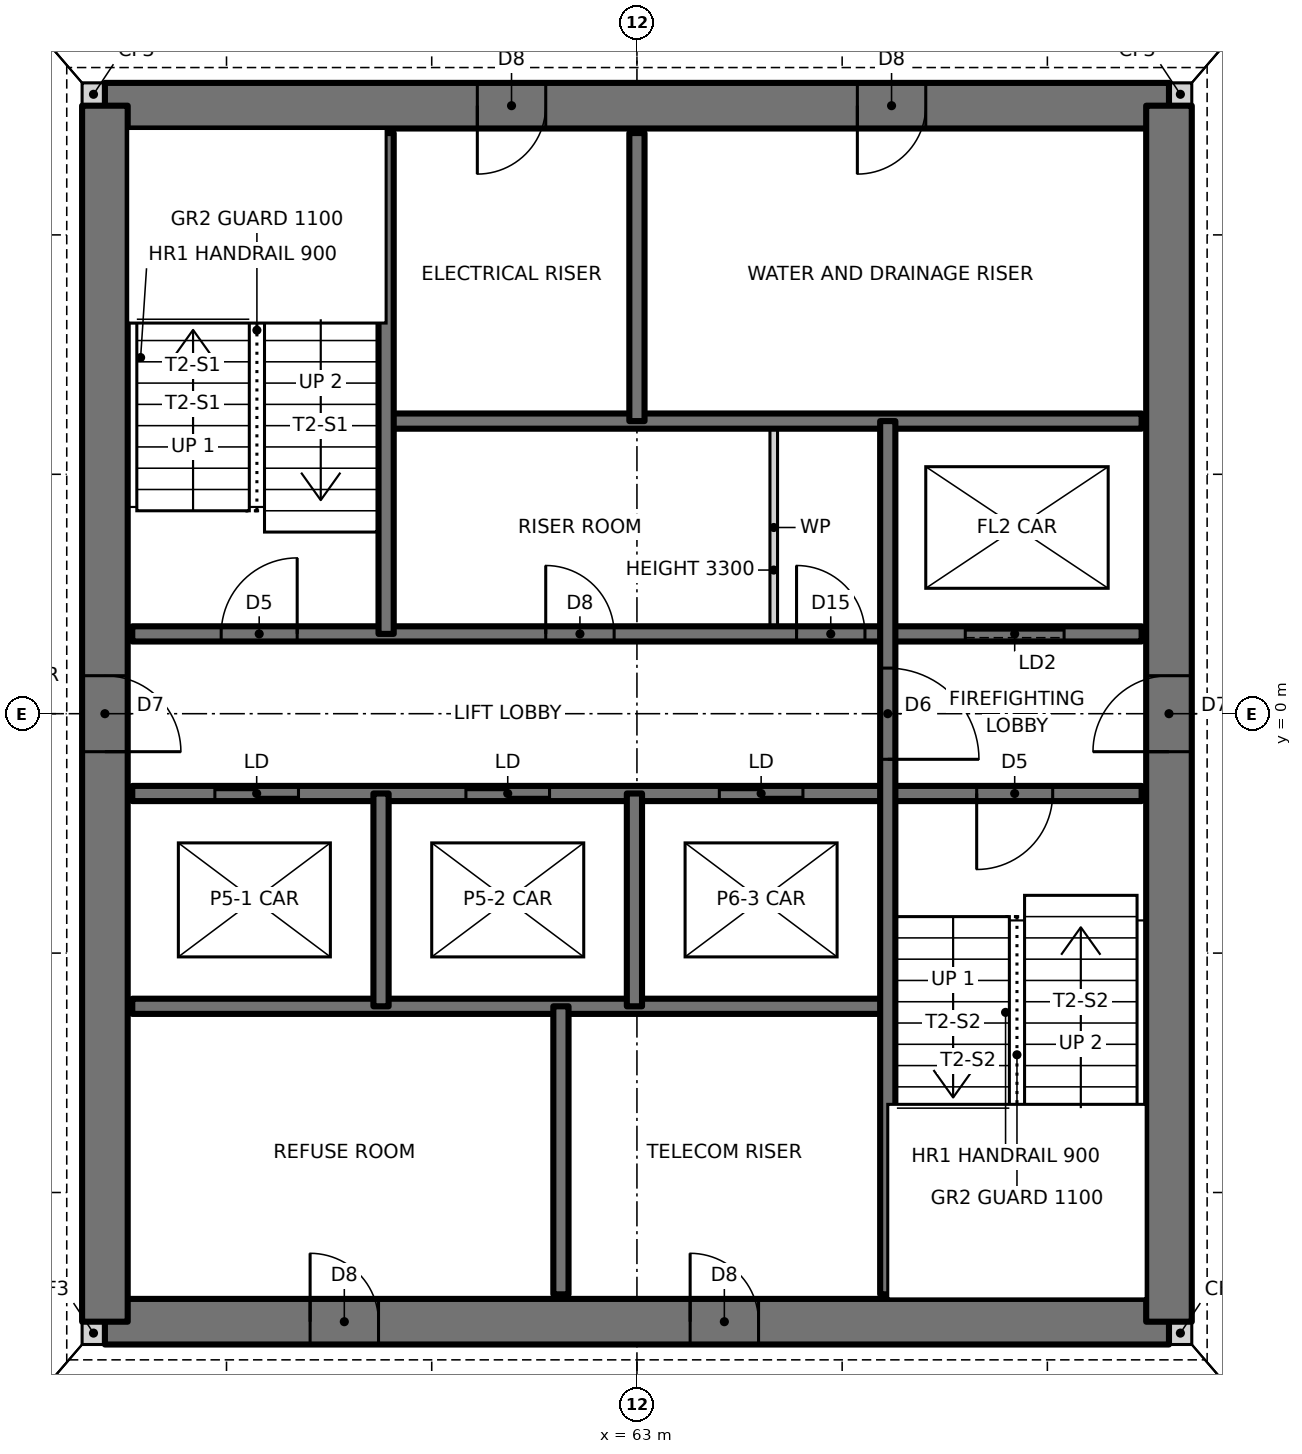
"""IFC4 building model, lengths in metres.
Left out: names, types, materials, properties, quantities, classifications, styles, units other than length and angle.
Written with IfcOpenShell. Run it as: python <this file> out.ifc"""

import sys

from ifc_helpers import new_model, si_unit, direction, frame, frame_2d, origin, place, context, subcontext, project, spatial, rectangle, extrude, element, fill, save


model = new_model("IFC4")
c1 = context("Model", 3, precision=1e-05, world=origin(), true_north=direction((0.0, 1.0)))
c2 = subcontext(c1, "Body", "Model", "MODEL_VIEW")
j1 = project(units=[si_unit("LENGTHUNIT", "METRE"), si_unit("PLANEANGLEUNIT", "RADIAN")], contexts=[c1])
p1 = place(None, origin())
s1 = spatial("IfcSite", under=j1, at=p1, CompositionType="ELEMENT")
p2 = place(p1, origin())
s2 = spatial("IfcBuilding", under=s1, at=p2, CompositionType="ELEMENT")
p3 = place(p2, frame((0.0, 0.0, 53.5)))
s3 = spatial("IfcBuildingStorey", under=s2, at=p3, CompositionType="ELEMENT", Elevation=53.5)
for number, where, z_axis, x_axis in (
    (1, (55.7, -8.15, 0.0), (0.0, 0.0, 1.0), (1.0, 0.0, 0.0)),
    (2, (70.0, -8.15, 0.0), (0.0, 0.0, 1.0), (1.0, 0.0, 0.0)),
    (3, (70.0, 8.15, 0.0), (0.0, 0.0, 1.0), (1.0, 0.0, 0.0)),
    (4, (55.7, 8.15, 0.0), (0.0, 0.0, 1.0), (1.0, 0.0, 0.0)),
):
    element("IfcWall", number, at=place(p3, frame(where, z_axis=z_axis, x_axis=x_axis)), inside=s3, PredefinedType="SOLIDWALL", context=c2, shape_type="SweptSolid", body=[
        extrude(rectangle(XDim=0.3, YDim=0.3, at=frame_2d((0.15, 0.0))), origin(), (0.0, 0.0, 1.0), 3.5),
    ])
p4 = place(p3, frame((56.0, -8.0, 0.0), z_axis=(0.0, 0.0, 1.0), x_axis=(1.0, 0.0, 0.0)))
e5 = element("IfcWall", 5, at=p4, inside=s3, PredefinedType="SHEAR", context=c2, shape_type="SweptSolid", body=[
    extrude(rectangle(XDim=14.0, YDim=0.6, at=frame_2d((7.0, 0.0))), origin(), (0.0, 0.0, 1.0), 3.5),
])
p5 = place(p4, frame((2.7, 0.0, 0.0)))
e6 = element("IfcOpeningElement", 6, at=p5, cuts=e5, PredefinedType="OPENING", context=c2, shape_type="SweptSolid", body=[
    extrude(rectangle(XDim=0.9, YDim=2.1, at=frame_2d((0.45, 1.05))), frame((0.0, 0.31, 0.0), z_axis=(0.0, -1.0, 0.0), x_axis=(1.0, 0.0, 0.0)), (0.0, 0.0, 1.0), 0.62),
])
p6 = place(p4, frame((7.7, 0.0, 0.0)))
e7 = element("IfcOpeningElement", 7, at=p6, cuts=e5, PredefinedType="OPENING", context=c2, shape_type="SweptSolid", body=[
    extrude(rectangle(XDim=0.9, YDim=2.1, at=frame_2d((0.45, 1.05))), frame((0.0, 0.31, 0.0), z_axis=(0.0, -1.0, 0.0), x_axis=(1.0, 0.0, 0.0)), (0.0, 0.0, 1.0), 0.62),
])
p7 = place(p3, frame((70.0, 8.0, 0.0), z_axis=(0.0, 0.0, 1.0), x_axis=(-1.0, 0.0, 0.0)))
e8 = element("IfcWall", 8, at=p7, inside=s3, PredefinedType="SHEAR", context=c2, shape_type="SweptSolid", body=[
    extrude(rectangle(XDim=14.0, YDim=0.6, at=frame_2d((7.0, 0.0))), origin(), (0.0, 0.0, 1.0), 3.5),
])
p8 = place(p7, frame((8.2, 0.0, 0.0)))
e9 = element("IfcOpeningElement", 9, at=p8, cuts=e8, PredefinedType="OPENING", context=c2, shape_type="SweptSolid", body=[
    extrude(rectangle(XDim=0.9, YDim=2.1, at=frame_2d((0.45, 1.05))), frame((0.0, 0.31, 0.0), z_axis=(0.0, -1.0, 0.0), x_axis=(1.0, 0.0, 0.0)), (0.0, 0.0, 1.0), 0.62),
])
p9 = place(p7, frame((3.2, 0.0, 0.0)))
e10 = element("IfcOpeningElement", 10, at=p9, cuts=e8, PredefinedType="OPENING", context=c2, shape_type="SweptSolid", body=[
    extrude(rectangle(XDim=0.9, YDim=2.1, at=frame_2d((0.45, 1.05))), frame((0.0, 0.31, 0.0), z_axis=(0.0, -1.0, 0.0), x_axis=(1.0, 0.0, 0.0)), (0.0, 0.0, 1.0), 0.62),
])
p10 = place(p3, frame((70.0, -8.0, 0.0), z_axis=(0.0, 0.0, 1.0), x_axis=(0.0, 1.0, 0.0)))
e11 = element("IfcWall", 11, at=p10, inside=s3, PredefinedType="SHEAR", context=c2, shape_type="SweptSolid", body=[
    extrude(rectangle(XDim=16.0, YDim=0.6, at=frame_2d((8.0, 0.0))), origin(), (0.0, 0.0, 1.0), 3.5),
])
p11 = place(p10, frame((7.5, 0.0, 0.0)))
e12 = element("IfcOpeningElement", 12, at=p11, cuts=e11, PredefinedType="OPENING", context=c2, shape_type="SweptSolid", body=[
    extrude(rectangle(XDim=1.0, YDim=2.1, at=frame_2d((0.5, 1.05))), frame((0.0, 0.31, 0.0), z_axis=(0.0, -1.0, 0.0), x_axis=(1.0, 0.0, 0.0)), (0.0, 0.0, 1.0), 0.62),
])
p12 = place(p3, frame((56.0, 8.0, 0.0), z_axis=(0.0, 0.0, 1.0), x_axis=(0.0, -1.0, 0.0)))
e13 = element("IfcWall", 13, at=p12, inside=s3, PredefinedType="SHEAR", context=c2, shape_type="SweptSolid", body=[
    extrude(rectangle(XDim=16.0, YDim=0.6, at=frame_2d((8.0, 0.0))), origin(), (0.0, 0.0, 1.0), 3.5),
])
p13 = place(p12, frame((7.5, 0.0, 0.0)))
e14 = element("IfcOpeningElement", 14, at=p13, cuts=e13, PredefinedType="OPENING", context=c2, shape_type="SweptSolid", body=[
    extrude(rectangle(XDim=1.0, YDim=2.1, at=frame_2d((0.5, 1.05))), frame((0.0, 0.31, 0.0), z_axis=(0.0, -1.0, 0.0), x_axis=(1.0, 0.0, 0.0)), (0.0, 0.0, 1.0), 0.62),
])
p14 = place(p3, frame((56.36, -3.85, 0.0), z_axis=(0.0, 0.0, 1.0), x_axis=(1.0, 0.0, 0.0)))
e15 = element("IfcWall", 15, at=p14, inside=s3, PredefinedType="SOLIDWALL", context=c2, shape_type="SweptSolid", body=[
    extrude(rectangle(XDim=9.94, YDim=0.2, at=frame_2d((4.97, 0.0))), origin(), (0.0, 0.0, 1.0), 3.5),
])
p15 = place(p3, frame((56.36, -1.05, 0.0), z_axis=(0.0, 0.0, 1.0), x_axis=(1.0, 0.0, 0.0)))
e16 = element("IfcWall", 16, at=p15, inside=s3, PredefinedType="SOLIDWALL", context=c2, shape_type="SweptSolid", body=[
    extrude(rectangle(XDim=13.28, YDim=0.2, at=frame_2d((6.64, 0.0))), origin(), (0.0, 0.0, 1.0), 3.5),
])
p16 = place(p15, frame((11.11, 0.0, 0.0)))
e17 = element("IfcOpeningElement", 17, at=p16, cuts=e16, PredefinedType="OPENING", context=c2, shape_type="SweptSolid", body=[
    extrude(rectangle(XDim=1.0, YDim=2.1, at=frame_2d((0.5, 1.05))), frame((0.0, 0.11, 0.0), z_axis=(0.0, -1.0, 0.0), x_axis=(1.0, 0.0, 0.0)), (0.0, 0.0, 1.0), 0.22),
])
p17 = place(p15, frame((1.087, 0.0, 0.0)))
e18 = element("IfcOpeningElement", 18, at=p17, cuts=e16, PredefinedType="OPENING", context=c2, shape_type="SweptSolid", body=[
    extrude(rectangle(XDim=1.1, YDim=2.1, at=frame_2d((0.55, 1.05))), frame((0.0, 0.11, 0.0), z_axis=(0.0, -1.0, 0.0), x_axis=(1.0, 0.0, 0.0)), (0.0, 0.0, 1.0), 0.22),
])
p18 = place(p15, frame((4.39, 0.0, 0.0)))
e19 = element("IfcOpeningElement", 19, at=p18, cuts=e16, PredefinedType="OPENING", context=c2, shape_type="SweptSolid", body=[
    extrude(rectangle(XDim=1.1, YDim=2.1, at=frame_2d((0.55, 1.05))), frame((0.0, 0.11, 0.0), z_axis=(0.0, -1.0, 0.0), x_axis=(1.0, 0.0, 0.0)), (0.0, 0.0, 1.0), 0.22),
])
p19 = place(p15, frame((7.724, 0.0, 0.0)))
e20 = element("IfcOpeningElement", 20, at=p19, cuts=e16, PredefinedType="OPENING", context=c2, shape_type="SweptSolid", body=[
    extrude(rectangle(XDim=1.1, YDim=2.1, at=frame_2d((0.55, 1.05))), frame((0.0, 0.11, 0.0), z_axis=(0.0, -1.0, 0.0), x_axis=(1.0, 0.0, 0.0)), (0.0, 0.0, 1.0), 0.22),
])
p20 = place(p3, frame((56.36, 1.05, 0.0), z_axis=(0.0, 0.0, 1.0), x_axis=(1.0, 0.0, 0.0)))
e21 = element("IfcWall", 21, at=p20, inside=s3, PredefinedType="SOLIDWALL", context=c2, shape_type="SweptSolid", body=[
    extrude(rectangle(XDim=13.28, YDim=0.2, at=frame_2d((6.64, 0.0))), origin(), (0.0, 0.0, 1.0), 3.5),
])
p21 = place(p20, frame((1.17, 0.0, 0.0)))
e22 = element("IfcOpeningElement", 22, at=p21, cuts=e21, PredefinedType="OPENING", context=c2, shape_type="SweptSolid", body=[
    extrude(rectangle(XDim=1.0, YDim=2.1, at=frame_2d((0.5, 1.05))), frame((0.0, 0.11, 0.0), z_axis=(0.0, -1.0, 0.0), x_axis=(1.0, 0.0, 0.0)), (0.0, 0.0, 1.0), 0.22),
])
p22 = place(p20, frame((5.44, 0.0, 0.0)))
e23 = element("IfcOpeningElement", 23, at=p22, cuts=e21, PredefinedType="OPENING", context=c2, shape_type="SweptSolid", body=[
    extrude(rectangle(XDim=0.9, YDim=2.1, at=frame_2d((0.45, 1.05))), frame((0.0, 0.11, 0.0), z_axis=(0.0, -1.0, 0.0), x_axis=(1.0, 0.0, 0.0)), (0.0, 0.0, 1.0), 0.22),
])
p23 = place(p20, frame((8.74, 0.0, 0.0)))
e24 = element("IfcOpeningElement", 24, at=p23, cuts=e21, PredefinedType="OPENING", context=c2, shape_type="SweptSolid", body=[
    extrude(rectangle(XDim=0.9, YDim=2.1, at=frame_2d((0.45, 1.05))), frame((0.0, 0.11, 0.0), z_axis=(0.0, -1.0, 0.0), x_axis=(1.0, 0.0, 0.0)), (0.0, 0.0, 1.0), 0.22),
])
p24 = place(p20, frame((10.96, 0.0, 0.0)))
e25 = element("IfcOpeningElement", 25, at=p24, cuts=e21, PredefinedType="OPENING", context=c2, shape_type="SweptSolid", body=[
    extrude(rectangle(XDim=1.3, YDim=2.1, at=frame_2d((0.65, 1.05))), frame((0.0, 0.11, 0.0), z_axis=(0.0, -1.0, 0.0), x_axis=(1.0, 0.0, 0.0)), (0.0, 0.0, 1.0), 0.22),
])
p25 = place(p3, frame((59.7, 3.85, 0.0), z_axis=(0.0, 0.0, 1.0), x_axis=(1.0, 0.0, 0.0)))
e26 = element("IfcWall", 26, at=p25, inside=s3, PredefinedType="SOLIDWALL", context=c2, shape_type="SweptSolid", body=[
    extrude(rectangle(XDim=9.94, YDim=0.2, at=frame_2d((4.97, 0.0))), origin(), (0.0, 0.0, 1.0), 3.5),
])
p26 = place(p3, frame((66.3, -7.64, 0.0), z_axis=(0.0, 0.0, 1.0), x_axis=(0.0, 1.0, 0.0)))
e27 = element("IfcWall", 27, at=p26, inside=s3, PredefinedType="SOLIDWALL", context=c2, shape_type="SweptSolid", body=[
    extrude(rectangle(XDim=11.49, YDim=0.2, at=frame_2d((5.745, 0.0))), origin(), (0.0, 0.0, 1.0), 3.5),
])
p27 = place(p26, frame((7.04, 0.0, 0.0)))
e28 = element("IfcOpeningElement", 28, at=p27, cuts=e27, PredefinedType="OPENING", context=c2, shape_type="SweptSolid", body=[
    extrude(rectangle(XDim=1.2, YDim=2.1, at=frame_2d((0.6, 1.05))), frame((0.0, 0.11, 0.0), z_axis=(0.0, -1.0, 0.0), x_axis=(1.0, 0.0, 0.0)), (0.0, 0.0, 1.0), 0.22),
])
p28 = place(p3, frame((64.8, 1.05, 0.0), z_axis=(0.0, 0.0, 1.0), x_axis=(0.0, 1.0, 0.0)))
e29 = element("IfcWall", 29, at=p28, inside=s3, PredefinedType="PARTITIONING", context=c2, shape_type="SweptSolid", body=[
    extrude(rectangle(XDim=2.8, YDim=0.1, at=frame_2d((1.4, 0.0))), origin(), (0.0, 0.0, 1.0), 3.3),
])
p29 = place(p3, frame((63.0, 3.85, 0.0), z_axis=(0.0, 0.0, 1.0), x_axis=(0.0, 1.0, 0.0)))
e30 = element("IfcWall", 30, at=p29, inside=s3, PredefinedType="SOLIDWALL", context=c2, shape_type="SweptSolid", body=[
    extrude(rectangle(XDim=3.79, YDim=0.2, at=frame_2d((1.895, 0.0))), origin(), (0.0, 0.0, 1.0), 3.5),
])
p30 = place(p3, frame((62.967, -3.85, 0.0), z_axis=(0.0, 0.0, 1.0), x_axis=(0.0, 1.0, 0.0)))
e31 = element("IfcWall", 31, at=p30, inside=s3, PredefinedType="SOLIDWALL", context=c2, shape_type="SweptSolid", body=[
    extrude(rectangle(XDim=2.8, YDim=0.2, at=frame_2d((1.4, 0.0))), origin(), (0.0, 0.0, 1.0), 3.5),
])
p31 = place(p3, frame((62.0, -7.64, 0.0), z_axis=(0.0, 0.0, 1.0), x_axis=(0.0, 1.0, 0.0)))
e32 = element("IfcWall", 32, at=p31, inside=s3, PredefinedType="SOLIDWALL", context=c2, shape_type="SweptSolid", body=[
    extrude(rectangle(XDim=3.79, YDim=0.2, at=frame_2d((1.895, 0.0))), origin(), (0.0, 0.0, 1.0), 3.5),
])
p32 = place(p3, frame((59.7, 1.05, 0.0), z_axis=(0.0, 0.0, 1.0), x_axis=(0.0, 1.0, 0.0)))
e33 = element("IfcWall", 33, at=p32, inside=s3, PredefinedType="SOLIDWALL", context=c2, shape_type="SweptSolid", body=[
    extrude(rectangle(XDim=6.59, YDim=0.2, at=frame_2d((3.295, 0.0))), origin(), (0.0, 0.0, 1.0), 3.5),
])
p33 = place(p3, frame((59.633, -3.85, 0.0), z_axis=(0.0, 0.0, 1.0), x_axis=(0.0, 1.0, 0.0)))
e34 = element("IfcWall", 34, at=p33, inside=s3, PredefinedType="SOLIDWALL", context=c2, shape_type="SweptSolid", body=[
    extrude(rectangle(XDim=2.8, YDim=0.2, at=frame_2d((1.4, 0.0))), origin(), (0.0, 0.0, 1.0), 3.5),
])
p34 = place(p21, origin())
e35 = element("IfcDoor", 35, at=p34, inside=s3, OperationType="SINGLE_SWING_RIGHT", PredefinedType="DOOR", context=c2, shape_type="SweptSolid", body=[
    extrude(rectangle(XDim=1.0, YDim=2.1, at=frame_2d((0.5, 1.05))), frame((0.0, 0.025, 0.0), z_axis=(0.0, -1.0, 0.0), x_axis=(1.0, 0.0, 0.0)), (0.0, 0.0, 1.0), 0.05),
])
fill(e22, e35)
p35 = place(p16, frame((1.0, 0.0, 0.0), z_axis=(0.0, 0.0, 1.0), x_axis=(-1.0, 0.0, 0.0)))
e36 = element("IfcDoor", 36, at=p35, inside=s3, OperationType="SINGLE_SWING_RIGHT", PredefinedType="DOOR", context=c2, shape_type="SweptSolid", body=[
    extrude(rectangle(XDim=1.0, YDim=2.1, at=frame_2d((0.5, 1.05))), frame((0.0, 0.025, 0.0), z_axis=(0.0, -1.0, 0.0), x_axis=(1.0, 0.0, 0.0)), (0.0, 0.0, 1.0), 0.05),
])
fill(e17, e36)
p36 = place(p27, frame((1.2, 0.0, 0.0), z_axis=(0.0, 0.0, 1.0), x_axis=(-1.0, 0.0, 0.0)))
e37 = element("IfcDoor", 37, at=p36, inside=s3, OperationType="SINGLE_SWING_RIGHT", PredefinedType="DOOR", context=c2, shape_type="SweptSolid", body=[
    extrude(rectangle(XDim=1.2, YDim=2.1, at=frame_2d((0.6, 1.05))), frame((0.0, 0.025, 0.0), z_axis=(0.0, -1.0, 0.0), x_axis=(1.0, 0.0, 0.0)), (0.0, 0.0, 1.0), 0.05),
])
fill(e28, e37)
p37 = place(p22, origin())
e38 = element("IfcDoor", 38, at=p37, inside=s3, OperationType="SINGLE_SWING_LEFT", PredefinedType="DOOR", context=c2, shape_type="SweptSolid", body=[
    extrude(rectangle(XDim=0.9, YDim=2.1, at=frame_2d((0.45, 1.05))), frame((0.0, 0.025, 0.0), z_axis=(0.0, -1.0, 0.0), x_axis=(1.0, 0.0, 0.0)), (0.0, 0.0, 1.0), 0.05),
])
fill(e23, e38)
p38 = place(p23, origin())
e39 = element("IfcDoor", 39, at=p38, inside=s3, OperationType="SINGLE_SWING_LEFT", PredefinedType="DOOR", context=c2, shape_type="SweptSolid", body=[
    extrude(rectangle(XDim=0.9, YDim=2.1, at=frame_2d((0.45, 1.05))), frame((0.0, 0.025, 0.0), z_axis=(0.0, -1.0, 0.0), x_axis=(1.0, 0.0, 0.0)), (0.0, 0.0, 1.0), 0.05),
])
fill(e24, e39)
p39 = place(p13, origin())
e40 = element("IfcDoor", 40, at=p39, inside=s3, OperationType="SINGLE_SWING_RIGHT", PredefinedType="DOOR", context=c2, shape_type="SweptSolid", body=[
    extrude(rectangle(XDim=1.0, YDim=2.1, at=frame_2d((0.5, 1.05))), frame((0.0, 0.025, 0.0), z_axis=(0.0, -1.0, 0.0), x_axis=(1.0, 0.0, 0.0)), (0.0, 0.0, 1.0), 0.05),
])
fill(e14, e40)
p40 = place(p11, origin())
e41 = element("IfcDoor", 41, at=p40, inside=s3, OperationType="SINGLE_SWING_LEFT", PredefinedType="DOOR", context=c2, shape_type="SweptSolid", body=[
    extrude(rectangle(XDim=1.0, YDim=2.1, at=frame_2d((0.5, 1.05))), frame((0.0, 0.025, 0.0), z_axis=(0.0, -1.0, 0.0), x_axis=(1.0, 0.0, 0.0)), (0.0, 0.0, 1.0), 0.05),
])
fill(e12, e41)
p41 = place(p8, origin())
e42 = element("IfcDoor", 42, at=p41, inside=s3, OperationType="SINGLE_SWING_RIGHT", PredefinedType="DOOR", context=c2, shape_type="SweptSolid", body=[
    extrude(rectangle(XDim=0.9, YDim=2.1, at=frame_2d((0.45, 1.05))), frame((0.0, 0.025, 0.0), z_axis=(0.0, -1.0, 0.0), x_axis=(1.0, 0.0, 0.0)), (0.0, 0.0, 1.0), 0.05),
])
fill(e9, e42)
p42 = place(p9, origin())
e43 = element("IfcDoor", 43, at=p42, inside=s3, OperationType="SINGLE_SWING_RIGHT", PredefinedType="DOOR", context=c2, shape_type="SweptSolid", body=[
    extrude(rectangle(XDim=0.9, YDim=2.1, at=frame_2d((0.45, 1.05))), frame((0.0, 0.025, 0.0), z_axis=(0.0, -1.0, 0.0), x_axis=(1.0, 0.0, 0.0)), (0.0, 0.0, 1.0), 0.05),
])
fill(e10, e43)
p43 = place(p5, origin())
e44 = element("IfcDoor", 44, at=p43, inside=s3, OperationType="SINGLE_SWING_LEFT", PredefinedType="DOOR", context=c2, shape_type="SweptSolid", body=[
    extrude(rectangle(XDim=0.9, YDim=2.1, at=frame_2d((0.45, 1.05))), frame((0.0, 0.025, 0.0), z_axis=(0.0, -1.0, 0.0), x_axis=(1.0, 0.0, 0.0)), (0.0, 0.0, 1.0), 0.05),
])
fill(e6, e44)
p44 = place(p6, origin())
e45 = element("IfcDoor", 45, at=p44, inside=s3, OperationType="SINGLE_SWING_LEFT", PredefinedType="DOOR", context=c2, shape_type="SweptSolid", body=[
    extrude(rectangle(XDim=0.9, YDim=2.1, at=frame_2d((0.45, 1.05))), frame((0.0, 0.025, 0.0), z_axis=(0.0, -1.0, 0.0), x_axis=(1.0, 0.0, 0.0)), (0.0, 0.0, 1.0), 0.05),
])
fill(e7, e45)
p45 = place(p17, origin())
e46 = element("IfcDoor", 46, at=p45, inside=s3, OperationType="DOUBLE_DOOR_SLIDING", PredefinedType="DOOR", context=c2, shape_type="SweptSolid", body=[
    extrude(rectangle(XDim=1.1, YDim=2.1, at=frame_2d((0.55, 1.05))), frame((0.0, 0.025, 0.0), z_axis=(0.0, -1.0, 0.0), x_axis=(1.0, 0.0, 0.0)), (0.0, 0.0, 1.0), 0.05),
])
fill(e18, e46)
p46 = place(p18, origin())
e47 = element("IfcDoor", 47, at=p46, inside=s3, OperationType="DOUBLE_DOOR_SLIDING", PredefinedType="DOOR", context=c2, shape_type="SweptSolid", body=[
    extrude(rectangle(XDim=1.1, YDim=2.1, at=frame_2d((0.55, 1.05))), frame((0.0, 0.025, 0.0), z_axis=(0.0, -1.0, 0.0), x_axis=(1.0, 0.0, 0.0)), (0.0, 0.0, 1.0), 0.05),
])
fill(e19, e47)
p47 = place(p19, origin())
e48 = element("IfcDoor", 48, at=p47, inside=s3, OperationType="DOUBLE_DOOR_SLIDING", PredefinedType="DOOR", context=c2, shape_type="SweptSolid", body=[
    extrude(rectangle(XDim=1.1, YDim=2.1, at=frame_2d((0.55, 1.05))), frame((0.0, 0.025, 0.0), z_axis=(0.0, -1.0, 0.0), x_axis=(1.0, 0.0, 0.0)), (0.0, 0.0, 1.0), 0.05),
])
fill(e20, e48)
p48 = place(p24, origin())
e49 = element("IfcDoor", 49, at=p48, inside=s3, OperationType="SLIDING_TO_LEFT", PredefinedType="DOOR", context=c2, shape_type="SweptSolid", body=[
    extrude(rectangle(XDim=1.3, YDim=2.1, at=frame_2d((0.65, 1.05))), frame((0.0, 0.025, 0.0), z_axis=(0.0, -1.0, 0.0), x_axis=(1.0, 0.0, 0.0)), (0.0, 0.0, 1.0), 0.05),
])
fill(e25, e49)
save(model, sys.argv[1])
